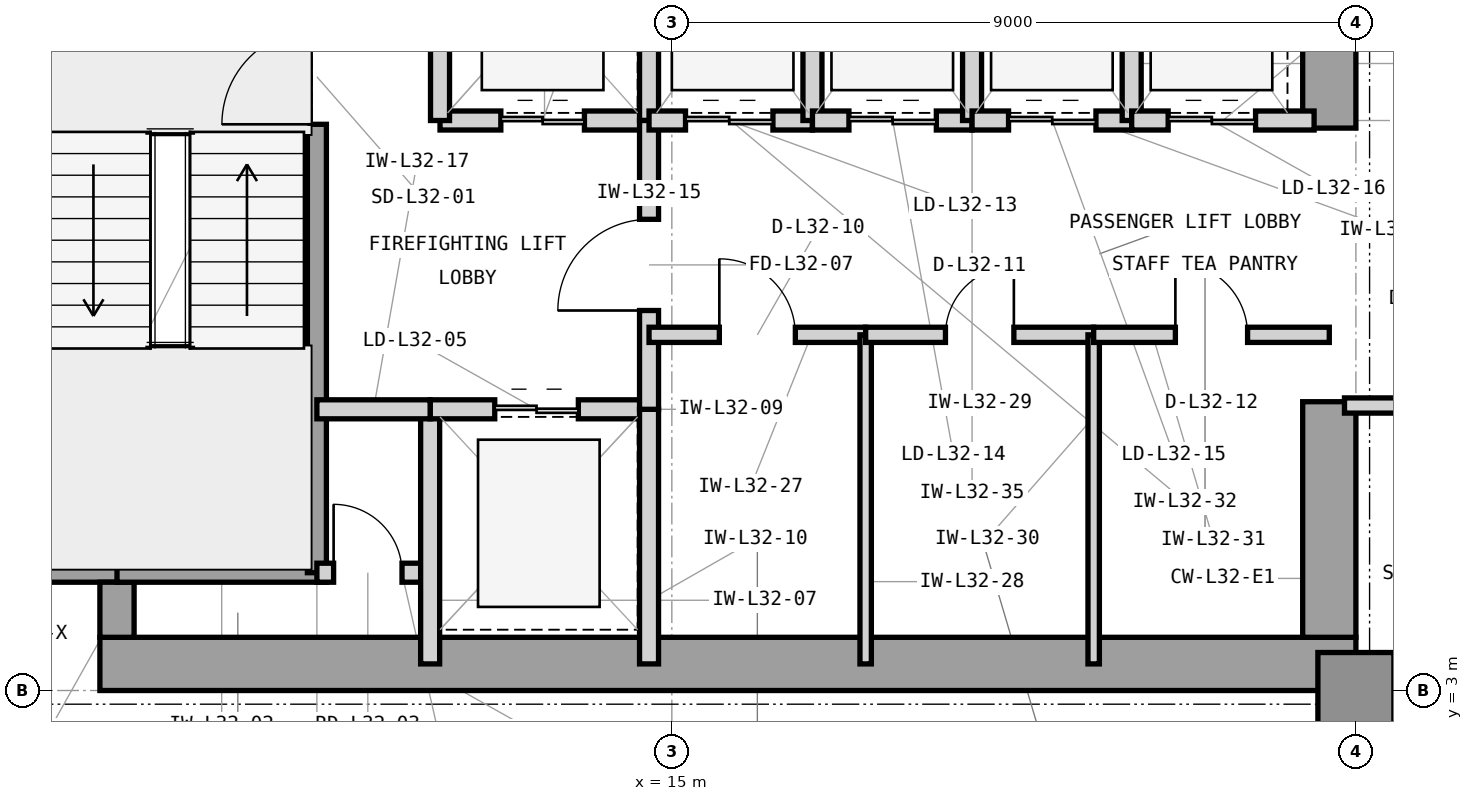
"""IFC4 building model, lengths in metres.
Left out: names, types, materials, properties, quantities, classifications, styles, units other than length and angle.
Written with IfcOpenShell. Run it as: python <this file> out.ifc"""

import sys

from ifc_helpers import new_model, si_unit, direction, frame, frame_2d, origin, origin_2d, place, context, subcontext, project, spatial, rectangle, extrude, element, fill, save


model = new_model("IFC4")
c1 = context("Model", 3, precision=1e-05, world=origin(), true_north=direction((0.0, 1.0)))
c2 = subcontext(c1, "Body", "Model", "MODEL_VIEW")
j1 = project(units=[si_unit("LENGTHUNIT", "METRE"), si_unit("PLANEANGLEUNIT", "RADIAN")], contexts=[c1])
p1 = place(None, origin())
s1 = spatial("IfcSite", under=j1, at=p1, CompositionType="ELEMENT")
p2 = place(p1, origin())
s2 = spatial("IfcBuilding", under=s1, at=p2, CompositionType="ELEMENT")
p3 = place(p2, frame((0.0, 0.0, 136.2)))
s3 = spatial("IfcBuildingStorey", under=s2, at=p3, CompositionType="ELEMENT", Elevation=136.2)
p4 = place(p3, frame((7.475, 3.35, 0.0), z_axis=(0.0, 0.0, 1.0), x_axis=(1.0, 0.0, 0.0)))
e1 = element("IfcWall", 1, at=p4, inside=s3, PredefinedType="SHEAR", context=c2, shape_type="SweptSolid", body=[
    extrude(rectangle(XDim=16.525, YDim=0.7, at=frame_2d((8.262, 0.0))), origin(), (0.0, 0.0, 1.0), 3.9),
])
p5 = place(p3, frame((23.65, 3.7, 0.0), z_axis=(0.0, 0.0, 1.0), x_axis=(0.0, 1.0, 0.0)))
e2 = element("IfcWall", 2, at=p5, inside=s3, PredefinedType="SHEAR", context=c2, shape_type="SweptSolid", body=[
    extrude(rectangle(XDim=3.1, YDim=0.7, at=frame_2d((1.55, 0.0))), origin(), (0.0, 0.0, 1.0), 3.9),
])
p6 = place(p3, frame((23.65, 10.4, 0.0), z_axis=(0.0, 0.0, 1.0), x_axis=(0.0, 1.0, 0.0)))
e3 = element("IfcWall", 3, at=p6, inside=s3, PredefinedType="SHEAR", context=c2, shape_type="SweptSolid", body=[
    extrude(rectangle(XDim=3.2, YDim=0.7, at=frame_2d((1.6, 0.0))), origin(), (0.0, 0.0, 1.0), 3.9),
])
p7 = place(p3, frame((6.7, 4.65, 0.0), z_axis=(0.0, 0.0, 1.0), x_axis=(1.0, 0.0, 0.0)))
e4 = element("IfcWall", 4, at=p7, inside=s3, PredefinedType="SHEAR", context=c2, shape_type="SweptSolid", body=[
    extrude(rectangle(XDim=1.225, YDim=0.45, at=frame_2d((0.613, 0.0))), origin(), (0.0, 0.0, 1.0), 3.9),
])
p8 = place(p3, frame((7.7, 3.7, 0.0), z_axis=(0.0, 0.0, 1.0), x_axis=(0.0, 1.0, 0.0)))
e5 = element("IfcWall", 5, at=p8, inside=s3, PredefinedType="SHEAR", context=c2, shape_type="SweptSolid", body=[
    extrude(rectangle(XDim=0.725, YDim=0.45, at=frame_2d((0.363, 0.0))), origin(), (0.0, 0.0, 1.0), 3.9),
])
p9 = place(p3, frame((24.0, 3.0, 0.0), z_axis=(0.0, 0.0, 1.0), x_axis=(1.0, 0.0, 0.0)))
e6 = element("IfcColumn", 6, at=p9, inside=s3, PredefinedType="COLUMN", context=c2, shape_type="SweptSolid", body=[
    extrude(rectangle(XDim=1.0, YDim=1.0, at=origin_2d()), origin(), (0.0, 0.0, 1.0), 3.9),
])
p10 = place(p3, frame((23.9, 3.21, 0.0), z_axis=(0.0, 0.0, 1.0), x_axis=(1.0, 0.0, 0.0)))
e7 = element("IfcWall", 7, at=p10, inside=s3, PredefinedType="STANDARD", context=c2, shape_type="SweptSolid", body=[
    extrude(rectangle(XDim=34.5, YDim=0.42, at=frame_2d((17.25, 0.0))), origin(), (0.0, 0.0, 1.0), 3.7),
])
p11 = place(p10, frame((11.071, 0.0, 0.85)))
e8 = element("IfcOpeningElement", 8, at=p11, cuts=e7, PredefinedType="OPENING", context=c2, shape_type="SweptSolid", body=[
    extrude(rectangle(XDim=2.5, YDim=2.25, at=frame_2d((1.25, 1.125))), frame((0.0, 0.22, 0.0), z_axis=(0.0, -1.0, 0.0), x_axis=(1.0, 0.0, 0.0)), (0.0, 0.0, 1.0), 0.44),
])
p12 = place(p10, frame((1.1, 0.0, 0.85)))
e9 = element("IfcOpeningElement", 9, at=p12, cuts=e7, PredefinedType="OPENING", context=c2, shape_type="SweptSolid", body=[
    extrude(rectangle(XDim=1.2, YDim=2.25, at=frame_2d((0.6, 1.125))), frame((0.0, 0.22, 0.0), z_axis=(0.0, -1.0, 0.0), x_axis=(1.0, 0.0, 0.0)), (0.0, 0.0, 1.0), 0.44),
])
p13 = place(p10, frame((5.036, 0.0, 0.85)))
e10 = element("IfcOpeningElement", 10, at=p13, cuts=e7, PredefinedType="OPENING", context=c2, shape_type="SweptSolid", body=[
    extrude(rectangle(XDim=2.5, YDim=2.25, at=frame_2d((1.25, 1.125))), frame((0.0, 0.22, 0.0), z_axis=(0.0, -1.0, 0.0), x_axis=(1.0, 0.0, 0.0)), (0.0, 0.0, 1.0), 0.44),
])
p14 = place(p10, frame((19.786, 0.0, 0.85)))
e11 = element("IfcOpeningElement", 11, at=p14, cuts=e7, PredefinedType="OPENING", context=c2, shape_type="SweptSolid", body=[
    extrude(rectangle(XDim=2.5, YDim=2.25, at=frame_2d((1.25, 1.125))), frame((0.0, 0.22, 0.0), z_axis=(0.0, -1.0, 0.0), x_axis=(1.0, 0.0, 0.0)), (0.0, 0.0, 1.0), 0.44),
])
p15 = place(p10, frame((25.086, 0.0, 0.85)))
e12 = element("IfcOpeningElement", 12, at=p15, cuts=e7, PredefinedType="OPENING", context=c2, shape_type="SweptSolid", body=[
    extrude(rectangle(XDim=1.2, YDim=2.25, at=frame_2d((0.6, 1.125))), frame((0.0, 0.22, 0.0), z_axis=(0.0, -1.0, 0.0), x_axis=(1.0, 0.0, 0.0)), (0.0, 0.0, 1.0), 0.44),
])
p16 = place(p3, frame((7.7, 4.55, 0.0), z_axis=(0.0, 0.0, 1.0), x_axis=(1.0, 0.0, 0.0)))
e13 = element("IfcWall", 13, at=p16, inside=s3, PredefinedType="SHEAR", context=c2, shape_type="SweptSolid", body=[
    extrude(rectangle(XDim=2.755, YDim=0.25, at=frame_2d((1.377, 0.0))), origin(), (0.0, 0.0, 1.0), 3.9),
])
p17 = place(p3, frame((10.33, 4.55, 0.0), z_axis=(0.0, 0.0, 1.0), x_axis=(0.0, 1.0, 0.0)))
e14 = element("IfcWall", 14, at=p17, inside=s3, PredefinedType="SHEAR", context=c2, shape_type="SweptSolid", body=[
    extrude(rectangle(XDim=7.45, YDim=0.25, at=frame_2d((3.725, 0.0))), origin(), (0.0, 0.0, 1.0), 3.9),
])
p18 = place(p17, frame((5.9, 0.0, 0.0)))
e15 = element("IfcOpeningElement", 15, at=p18, cuts=e14, PredefinedType="OPENING", context=c2, shape_type="SweptSolid", body=[
    extrude(rectangle(XDim=1.25, YDim=2.2, at=frame_2d((0.625, 1.1))), frame((0.0, 0.135, 0.0), z_axis=(0.0, -1.0, 0.0), x_axis=(1.0, 0.0, 0.0)), (0.0, 0.0, 1.0), 0.27),
])
p19 = place(p3, frame((10.33, 4.55, 0.0), z_axis=(0.0, 0.0, 1.0), x_axis=(1.0, 0.0, 0.0)))
e16 = element("IfcWall", 16, at=p19, inside=s3, PredefinedType="PARTITIONING", context=c2, shape_type="SweptSolid", body=[
    extrude(rectangle(XDim=1.49, YDim=0.25, at=frame_2d((0.745, 0.0))), origin(), (0.0, 0.0, 1.0), 3.69),
])
p20 = place(p19, frame((0.22, 0.0, 0.0)))
e17 = element("IfcOpeningElement", 17, at=p20, cuts=e16, PredefinedType="OPENING", context=c2, shape_type="SweptSolid", body=[
    extrude(rectangle(XDim=0.9, YDim=2.1, at=frame_2d((0.45, 1.05))), frame((0.0, 0.135, 0.0), z_axis=(0.0, -1.0, 0.0), x_axis=(1.0, 0.0, 0.0)), (0.0, 0.0, 1.0), 0.27),
])
p21 = place(p3, frame((11.82, 3.35, 0.0), z_axis=(0.0, 0.0, 1.0), x_axis=(0.0, 1.0, 0.0)))
e18 = element("IfcWall", 18, at=p21, inside=s3, PredefinedType="PARTITIONING", context=c2, shape_type="SweptSolid", body=[
    extrude(rectangle(XDim=3.35, YDim=0.25, at=frame_2d((1.675, 0.0))), origin(), (0.0, 0.0, 1.0), 3.69),
])
p22 = place(p3, frame((11.82, 6.7, 0.0), z_axis=(0.0, 0.0, 1.0), x_axis=(1.0, 0.0, 0.0)))
e19 = element("IfcWall", 19, at=p22, inside=s3, PredefinedType="PARTITIONING", context=c2, shape_type="SweptSolid", body=[
    extrude(rectangle(XDim=2.88, YDim=0.25, at=frame_2d((1.44, 0.0))), origin(), (0.0, 0.0, 1.0), 3.233),
])
p23 = place(p22, frame((0.85, 0.0, 0.0)))
e20 = element("IfcOpeningElement", 20, at=p23, cuts=e19, PredefinedType="OPENING", context=c2, shape_type="SweptSolid", body=[
    extrude(rectangle(XDim=1.1, YDim=2.25, at=frame_2d((0.55, 1.125))), frame((0.0, 0.135, 0.0), z_axis=(0.0, -1.0, 0.0), x_axis=(1.0, 0.0, 0.0)), (0.0, 0.0, 1.0), 0.27),
])
p24 = place(p3, frame((14.7, 3.35, 0.0), z_axis=(0.0, 0.0, 1.0), x_axis=(0.0, 1.0, 0.0)))
e21 = element("IfcWall", 21, at=p24, inside=s3, PredefinedType="PARTITIONING", context=c2, shape_type="SweptSolid", body=[
    extrude(rectangle(XDim=3.35, YDim=0.25, at=frame_2d((1.675, 0.0))), origin(), (0.0, 0.0, 1.0), 3.69),
])
p25 = place(p3, frame((11.95, 10.5, 0.0), z_axis=(0.0, 0.0, 1.0), x_axis=(1.0, 0.0, 0.0)))
e22 = element("IfcWall", 22, at=p25, inside=s3, PredefinedType="PARTITIONING", context=c2, shape_type="SweptSolid", body=[
    extrude(rectangle(XDim=2.75, YDim=0.25, at=frame_2d((1.375, 0.0))), origin(), (0.0, 0.0, 1.0), 3.233),
])
p26 = place(p25, frame((0.8, 0.0, 0.0)))
e23 = element("IfcOpeningElement", 23, at=p26, cuts=e22, PredefinedType="OPENING", context=c2, shape_type="SweptSolid", body=[
    extrude(rectangle(XDim=1.1, YDim=2.25, at=frame_2d((0.55, 1.125))), frame((0.0, 0.135, 0.0), z_axis=(0.0, -1.0, 0.0), x_axis=(1.0, 0.0, 0.0)), (0.0, 0.0, 1.0), 0.27),
])
for number, where, z_axis, x_axis in (
    (24, (11.95, 10.5, 0.0), (0.0, 0.0, 1.0), (0.0, 1.0, 0.0)),
    (25, (14.7, 10.5, 0.0), (0.0, 0.0, 1.0), (0.0, 1.0, 0.0)),
):
    element("IfcWall", number, at=place(p3, frame(where, z_axis=z_axis, x_axis=x_axis)), inside=s3, PredefinedType="PARTITIONING", context=c2, shape_type="SweptSolid", body=[
        extrude(rectangle(XDim=3.0, YDim=0.25, at=frame_2d((1.5, 0.0))), origin(), (0.0, 0.0, 1.0), 3.69),
    ])
p27 = place(p3, frame((14.7, 6.7, 0.0), z_axis=(0.0, 0.0, 1.0), x_axis=(0.0, 1.0, 0.0)))
e26 = element("IfcWall", 26, at=p27, inside=s3, PredefinedType="PARTITIONING", context=c2, shape_type="SweptSolid", body=[
    extrude(rectangle(XDim=3.8, YDim=0.25, at=frame_2d((1.9, 0.0))), origin(), (0.0, 0.0, 1.0), 3.69),
])
p28 = place(p27, frame((1.3, 0.0, 0.0)))
e27 = element("IfcOpeningElement", 27, at=p28, cuts=e26, PredefinedType="OPENING", context=c2, shape_type="SweptSolid", body=[
    extrude(rectangle(XDim=1.2, YDim=2.2, at=frame_2d((0.6, 1.1))), frame((0.0, 0.135, 0.0), z_axis=(0.0, -1.0, 0.0), x_axis=(1.0, 0.0, 0.0)), (0.0, 0.0, 1.0), 0.27),
])
p29 = place(p3, frame((10.33, 6.7, 0.0), z_axis=(0.0, 0.0, 1.0), x_axis=(1.0, 0.0, 0.0)))
e28 = element("IfcWall", 28, at=p29, inside=s3, PredefinedType="PARTITIONING", context=c2, shape_type="SweptSolid", body=[
    extrude(rectangle(XDim=1.49, YDim=0.25, at=frame_2d((0.745, 0.0))), origin(), (0.0, 0.0, 1.0), 3.233),
])
p30 = place(p3, frame((14.7, 7.68, 0.0), z_axis=(0.0, 0.0, 1.0), x_axis=(1.0, 0.0, 0.0)))
e29 = element("IfcWall", 29, at=p30, inside=s3, PredefinedType="PARTITIONING", context=c2, shape_type="SweptSolid", body=[
    extrude(rectangle(XDim=2.85, YDim=0.2, at=frame_2d((1.425, 0.0))), origin(), (0.0, 0.0, 1.0), 3.69),
])
p31 = place(p30, frame((0.925, 0.0, 0.0)))
e30 = element("IfcOpeningElement", 30, at=p31, cuts=e29, PredefinedType="OPENING", context=c2, shape_type="SweptSolid", body=[
    extrude(rectangle(XDim=1.0, YDim=2.15, at=frame_2d((0.5, 1.075))), frame((0.0, 0.11, 0.0), z_axis=(0.0, -1.0, 0.0), x_axis=(1.0, 0.0, 0.0)), (0.0, 0.0, 1.0), 0.22),
])
p32 = place(p3, frame((17.55, 3.35, 0.0), z_axis=(0.0, 0.0, 1.0), x_axis=(0.0, 1.0, 0.0)))
e31 = element("IfcWall", 31, at=p32, inside=s3, PredefinedType="PARTITIONING", context=c2, shape_type="SweptSolid", body=[
    extrude(rectangle(XDim=4.33, YDim=0.15, at=frame_2d((2.165, 0.0))), origin(), (0.0, 0.0, 1.0), 3.69),
])
p33 = place(p3, frame((17.55, 7.68, 0.0), z_axis=(0.0, 0.0, 1.0), x_axis=(1.0, 0.0, 0.0)))
e32 = element("IfcWall", 32, at=p33, inside=s3, PredefinedType="PARTITIONING", context=c2, shape_type="SweptSolid", body=[
    extrude(rectangle(XDim=3.0, YDim=0.2, at=frame_2d((1.5, 0.0))), origin(), (0.0, 0.0, 1.0), 3.69),
])
p34 = place(p33, frame((1.05, 0.0, 0.0)))
e33 = element("IfcOpeningElement", 33, at=p34, cuts=e32, PredefinedType="OPENING", context=c2, shape_type="SweptSolid", body=[
    extrude(rectangle(XDim=0.9, YDim=2.1, at=frame_2d((0.45, 1.05))), frame((0.0, 0.11, 0.0), z_axis=(0.0, -1.0, 0.0), x_axis=(1.0, 0.0, 0.0)), (0.0, 0.0, 1.0), 0.22),
])
p35 = place(p3, frame((20.55, 3.35, 0.0), z_axis=(0.0, 0.0, 1.0), x_axis=(0.0, 1.0, 0.0)))
e34 = element("IfcWall", 34, at=p35, inside=s3, PredefinedType="PARTITIONING", context=c2, shape_type="SweptSolid", body=[
    extrude(rectangle(XDim=4.33, YDim=0.15, at=frame_2d((2.165, 0.0))), origin(), (0.0, 0.0, 1.0), 3.69),
])
p36 = place(p3, frame((20.55, 7.68, 0.0), z_axis=(0.0, 0.0, 1.0), x_axis=(1.0, 0.0, 0.0)))
e35 = element("IfcWall", 35, at=p36, inside=s3, PredefinedType="PARTITIONING", context=c2, shape_type="SweptSolid", body=[
    extrude(rectangle(XDim=3.1, YDim=0.2, at=frame_2d((1.55, 0.0))), origin(), (0.0, 0.0, 1.0), 3.69),
])
p37 = place(p36, frame((1.075, 0.0, 0.0)))
e36 = element("IfcOpeningElement", 36, at=p37, cuts=e35, PredefinedType="OPENING", context=c2, shape_type="SweptSolid", body=[
    extrude(rectangle(XDim=0.95, YDim=2.1, at=frame_2d((0.475, 1.05))), frame((0.0, 0.11, 0.0), z_axis=(0.0, -1.0, 0.0), x_axis=(1.0, 0.0, 0.0)), (0.0, 0.0, 1.0), 0.22),
])
p38 = place(p3, frame((14.7, 10.5, 0.0), z_axis=(0.0, 0.0, 1.0), x_axis=(1.0, 0.0, 0.0)))
e37 = element("IfcWall", 37, at=p38, inside=s3, PredefinedType="PARTITIONING", context=c2, shape_type="SweptSolid", body=[
    extrude(rectangle(XDim=2.15, YDim=0.25, at=frame_2d((1.075, 0.0))), origin(), (0.0, 0.0, 1.0), 3.233),
])
p39 = place(p38, frame((0.48, 0.0, 0.0)))
e38 = element("IfcOpeningElement", 38, at=p39, cuts=e37, PredefinedType="OPENING", context=c2, shape_type="SweptSolid", body=[
    extrude(rectangle(XDim=1.15, YDim=2.25, at=frame_2d((0.575, 1.125))), frame((0.0, 0.135, 0.0), z_axis=(0.0, -1.0, 0.0), x_axis=(1.0, 0.0, 0.0)), (0.0, 0.0, 1.0), 0.27),
])
p40 = place(p3, frame((16.85, 10.5, 0.0), z_axis=(0.0, 0.0, 1.0), x_axis=(0.0, 1.0, 0.0)))
e39 = element("IfcWall", 39, at=p40, inside=s3, PredefinedType="PARTITIONING", context=c2, shape_type="SweptSolid", body=[
    extrude(rectangle(XDim=3.0, YDim=0.25, at=frame_2d((1.5, 0.0))), origin(), (0.0, 0.0, 1.0), 3.69),
])
p41 = place(p3, frame((16.85, 10.5, 0.0), z_axis=(0.0, 0.0, 1.0), x_axis=(1.0, 0.0, 0.0)))
e40 = element("IfcWall", 40, at=p41, inside=s3, PredefinedType="PARTITIONING", context=c2, shape_type="SweptSolid", body=[
    extrude(rectangle(XDim=2.1, YDim=0.25, at=frame_2d((1.05, 0.0))), origin(), (0.0, 0.0, 1.0), 3.233),
])
p42 = place(p41, frame((0.48, 0.0, 0.0)))
e41 = element("IfcOpeningElement", 41, at=p42, cuts=e40, PredefinedType="OPENING", context=c2, shape_type="SweptSolid", body=[
    extrude(rectangle(XDim=1.15, YDim=2.25, at=frame_2d((0.575, 1.125))), frame((0.0, 0.135, 0.0), z_axis=(0.0, -1.0, 0.0), x_axis=(1.0, 0.0, 0.0)), (0.0, 0.0, 1.0), 0.27),
])
p43 = place(p3, frame((18.95, 10.5, 0.0), z_axis=(0.0, 0.0, 1.0), x_axis=(0.0, 1.0, 0.0)))
e42 = element("IfcWall", 42, at=p43, inside=s3, PredefinedType="PARTITIONING", context=c2, shape_type="SweptSolid", body=[
    extrude(rectangle(XDim=3.0, YDim=0.25, at=frame_2d((1.5, 0.0))), origin(), (0.0, 0.0, 1.0), 3.69),
])
p44 = place(p3, frame((18.95, 10.5, 0.0), z_axis=(0.0, 0.0, 1.0), x_axis=(1.0, 0.0, 0.0)))
e43 = element("IfcWall", 43, at=p44, inside=s3, PredefinedType="PARTITIONING", context=c2, shape_type="SweptSolid", body=[
    extrude(rectangle(XDim=2.1, YDim=0.25, at=frame_2d((1.05, 0.0))), origin(), (0.0, 0.0, 1.0), 3.233),
])
p45 = place(p44, frame((0.48, 0.0, 0.0)))
e44 = element("IfcOpeningElement", 44, at=p45, cuts=e43, PredefinedType="OPENING", context=c2, shape_type="SweptSolid", body=[
    extrude(rectangle(XDim=1.15, YDim=2.25, at=frame_2d((0.575, 1.125))), frame((0.0, 0.135, 0.0), z_axis=(0.0, -1.0, 0.0), x_axis=(1.0, 0.0, 0.0)), (0.0, 0.0, 1.0), 0.27),
])
p46 = place(p3, frame((21.05, 10.5, 0.0), z_axis=(0.0, 0.0, 1.0), x_axis=(0.0, 1.0, 0.0)))
e45 = element("IfcWall", 45, at=p46, inside=s3, PredefinedType="PARTITIONING", context=c2, shape_type="SweptSolid", body=[
    extrude(rectangle(XDim=3.0, YDim=0.25, at=frame_2d((1.5, 0.0))), origin(), (0.0, 0.0, 1.0), 3.69),
])
p47 = place(p3, frame((21.05, 10.5, 0.0), z_axis=(0.0, 0.0, 1.0), x_axis=(1.0, 0.0, 0.0)))
e46 = element("IfcWall", 46, at=p47, inside=s3, PredefinedType="PARTITIONING", context=c2, shape_type="SweptSolid", body=[
    extrude(rectangle(XDim=2.4, YDim=0.25, at=frame_2d((1.2, 0.0))), origin(), (0.0, 0.0, 1.0), 3.233),
])
p48 = place(p47, frame((0.48, 0.0, 0.0)))
e47 = element("IfcOpeningElement", 47, at=p48, cuts=e46, PredefinedType="OPENING", context=c2, shape_type="SweptSolid", body=[
    extrude(rectangle(XDim=1.15, YDim=2.25, at=frame_2d((0.575, 1.125))), frame((0.0, 0.135, 0.0), z_axis=(0.0, -1.0, 0.0), x_axis=(1.0, 0.0, 0.0)), (0.0, 0.0, 1.0), 0.27),
])
p49 = place(p3, frame((23.85, 6.75, 0.0), z_axis=(0.0, 0.0, 1.0), x_axis=(1.0, 0.0, 0.0)))
e48 = element("IfcWall", 48, at=p49, inside=s3, PredefinedType="PARTITIONING", context=c2, shape_type="SweptSolid", body=[
    extrude(rectangle(XDim=2.85, YDim=0.2, at=frame_2d((1.425, 0.0))), origin(), (0.0, 0.0, 1.0), 3.69),
])
p50 = place(p49, frame((0.7, 0.0, 0.0)))
e49 = element("IfcOpeningElement", 49, at=p50, cuts=e48, PredefinedType="OPENING", context=c2, shape_type="SweptSolid", body=[
    extrude(rectangle(XDim=1.0, YDim=2.15, at=frame_2d((0.5, 1.075))), frame((0.0, 0.11, 0.0), z_axis=(0.0, -1.0, 0.0), x_axis=(1.0, 0.0, 0.0)), (0.0, 0.0, 1.0), 0.22),
])
p51 = place(p18, origin())
e50 = element("IfcDoor", 50, at=p51, inside=s3, OperationType="SINGLE_SWING_LEFT", PredefinedType="DOOR", context=c2, shape_type="SweptSolid", body=[
    extrude(rectangle(XDim=1.25, YDim=2.2, at=frame_2d((0.625, 1.1))), frame((0.0, 0.025, 0.0), z_axis=(0.0, -1.0, 0.0), x_axis=(1.0, 0.0, 0.0)), (0.0, 0.0, 1.0), 0.05),
])
fill(e15, e50)
p52 = place(p20, origin())
e51 = element("IfcDoor", 51, at=p52, inside=s3, OperationType="SINGLE_SWING_LEFT", PredefinedType="TRAPDOOR", context=c2, shape_type="SweptSolid", body=[
    extrude(rectangle(XDim=0.9, YDim=2.1, at=frame_2d((0.45, 1.05))), frame((0.0, 0.025, 0.0), z_axis=(0.0, -1.0, 0.0), x_axis=(1.0, 0.0, 0.0)), (0.0, 0.0, 1.0), 0.05),
])
fill(e17, e51)
p53 = place(p23, origin())
e52 = element("IfcDoor", 52, at=p53, inside=s3, OperationType="DOUBLE_DOOR_SLIDING", PredefinedType="DOOR", context=c2, shape_type="SweptSolid", body=[
    extrude(rectangle(XDim=1.1, YDim=2.25, at=frame_2d((0.55, 1.125))), frame((0.0, 0.025, 0.0), z_axis=(0.0, -1.0, 0.0), x_axis=(1.0, 0.0, 0.0)), (0.0, 0.0, 1.0), 0.05),
])
fill(e20, e52)
p54 = place(p26, origin())
e53 = element("IfcDoor", 53, at=p54, inside=s3, OperationType="DOUBLE_DOOR_SLIDING", PredefinedType="DOOR", context=c2, shape_type="SweptSolid", body=[
    extrude(rectangle(XDim=1.1, YDim=2.25, at=frame_2d((0.55, 1.125))), frame((0.0, 0.025, 0.0), z_axis=(0.0, -1.0, 0.0), x_axis=(1.0, 0.0, 0.0)), (0.0, 0.0, 1.0), 0.05),
])
fill(e23, e53)
p55 = place(p28, origin())
e54 = element("IfcDoor", 54, at=p55, inside=s3, OperationType="SINGLE_SWING_LEFT", PredefinedType="DOOR", context=c2, shape_type="SweptSolid", body=[
    extrude(rectangle(XDim=1.2, YDim=2.2, at=frame_2d((0.6, 1.1))), frame((0.0, 0.025, 0.0), z_axis=(0.0, -1.0, 0.0), x_axis=(1.0, 0.0, 0.0)), (0.0, 0.0, 1.0), 0.05),
])
fill(e27, e54)
p56 = place(p31, origin())
e55 = element("IfcDoor", 55, at=p56, inside=s3, OperationType="SINGLE_SWING_LEFT", PredefinedType="DOOR", context=c2, shape_type="SweptSolid", body=[
    extrude(rectangle(XDim=1.0, YDim=2.15, at=frame_2d((0.5, 1.075))), frame((0.0, 0.025, 0.0), z_axis=(0.0, -1.0, 0.0), x_axis=(1.0, 0.0, 0.0)), (0.0, 0.0, 1.0), 0.05),
])
fill(e30, e55)
p57 = place(p34, origin())
e56 = element("IfcDoor", 56, at=p57, inside=s3, OperationType="SINGLE_SWING_RIGHT", PredefinedType="TRAPDOOR", context=c2, shape_type="SweptSolid", body=[
    extrude(rectangle(XDim=0.9, YDim=2.1, at=frame_2d((0.45, 1.05))), frame((0.0, 0.025, 0.0), z_axis=(0.0, -1.0, 0.0), x_axis=(1.0, 0.0, 0.0)), (0.0, 0.0, 1.0), 0.05),
])
fill(e33, e56)
p58 = place(p37, origin())
e57 = element("IfcDoor", 57, at=p58, inside=s3, OperationType="SINGLE_SWING_LEFT", PredefinedType="DOOR", context=c2, shape_type="SweptSolid", body=[
    extrude(rectangle(XDim=0.95, YDim=2.1, at=frame_2d((0.475, 1.05))), frame((0.0, 0.025, 0.0), z_axis=(0.0, -1.0, 0.0), x_axis=(1.0, 0.0, 0.0)), (0.0, 0.0, 1.0), 0.05),
])
fill(e36, e57)
p59 = place(p39, origin())
e58 = element("IfcDoor", 58, at=p59, inside=s3, OperationType="DOUBLE_DOOR_SLIDING", PredefinedType="DOOR", context=c2, shape_type="SweptSolid", body=[
    extrude(rectangle(XDim=1.15, YDim=2.25, at=frame_2d((0.575, 1.125))), frame((0.0, 0.025, 0.0), z_axis=(0.0, -1.0, 0.0), x_axis=(1.0, 0.0, 0.0)), (0.0, 0.0, 1.0), 0.05),
])
fill(e38, e58)
p60 = place(p42, origin())
e59 = element("IfcDoor", 59, at=p60, inside=s3, OperationType="DOUBLE_DOOR_SLIDING", PredefinedType="DOOR", context=c2, shape_type="SweptSolid", body=[
    extrude(rectangle(XDim=1.15, YDim=2.25, at=frame_2d((0.575, 1.125))), frame((0.0, 0.025, 0.0), z_axis=(0.0, -1.0, 0.0), x_axis=(1.0, 0.0, 0.0)), (0.0, 0.0, 1.0), 0.05),
])
fill(e41, e59)
p61 = place(p45, origin())
e60 = element("IfcDoor", 60, at=p61, inside=s3, OperationType="DOUBLE_DOOR_SLIDING", PredefinedType="DOOR", context=c2, shape_type="SweptSolid", body=[
    extrude(rectangle(XDim=1.15, YDim=2.25, at=frame_2d((0.575, 1.125))), frame((0.0, 0.025, 0.0), z_axis=(0.0, -1.0, 0.0), x_axis=(1.0, 0.0, 0.0)), (0.0, 0.0, 1.0), 0.05),
])
fill(e44, e60)
p62 = place(p48, origin())
e61 = element("IfcDoor", 61, at=p62, inside=s3, OperationType="DOUBLE_DOOR_SLIDING", PredefinedType="DOOR", context=c2, shape_type="SweptSolid", body=[
    extrude(rectangle(XDim=1.15, YDim=2.25, at=frame_2d((0.575, 1.125))), frame((0.0, 0.025, 0.0), z_axis=(0.0, -1.0, 0.0), x_axis=(1.0, 0.0, 0.0)), (0.0, 0.0, 1.0), 0.05),
])
fill(e47, e61)
save(model, sys.argv[1])
